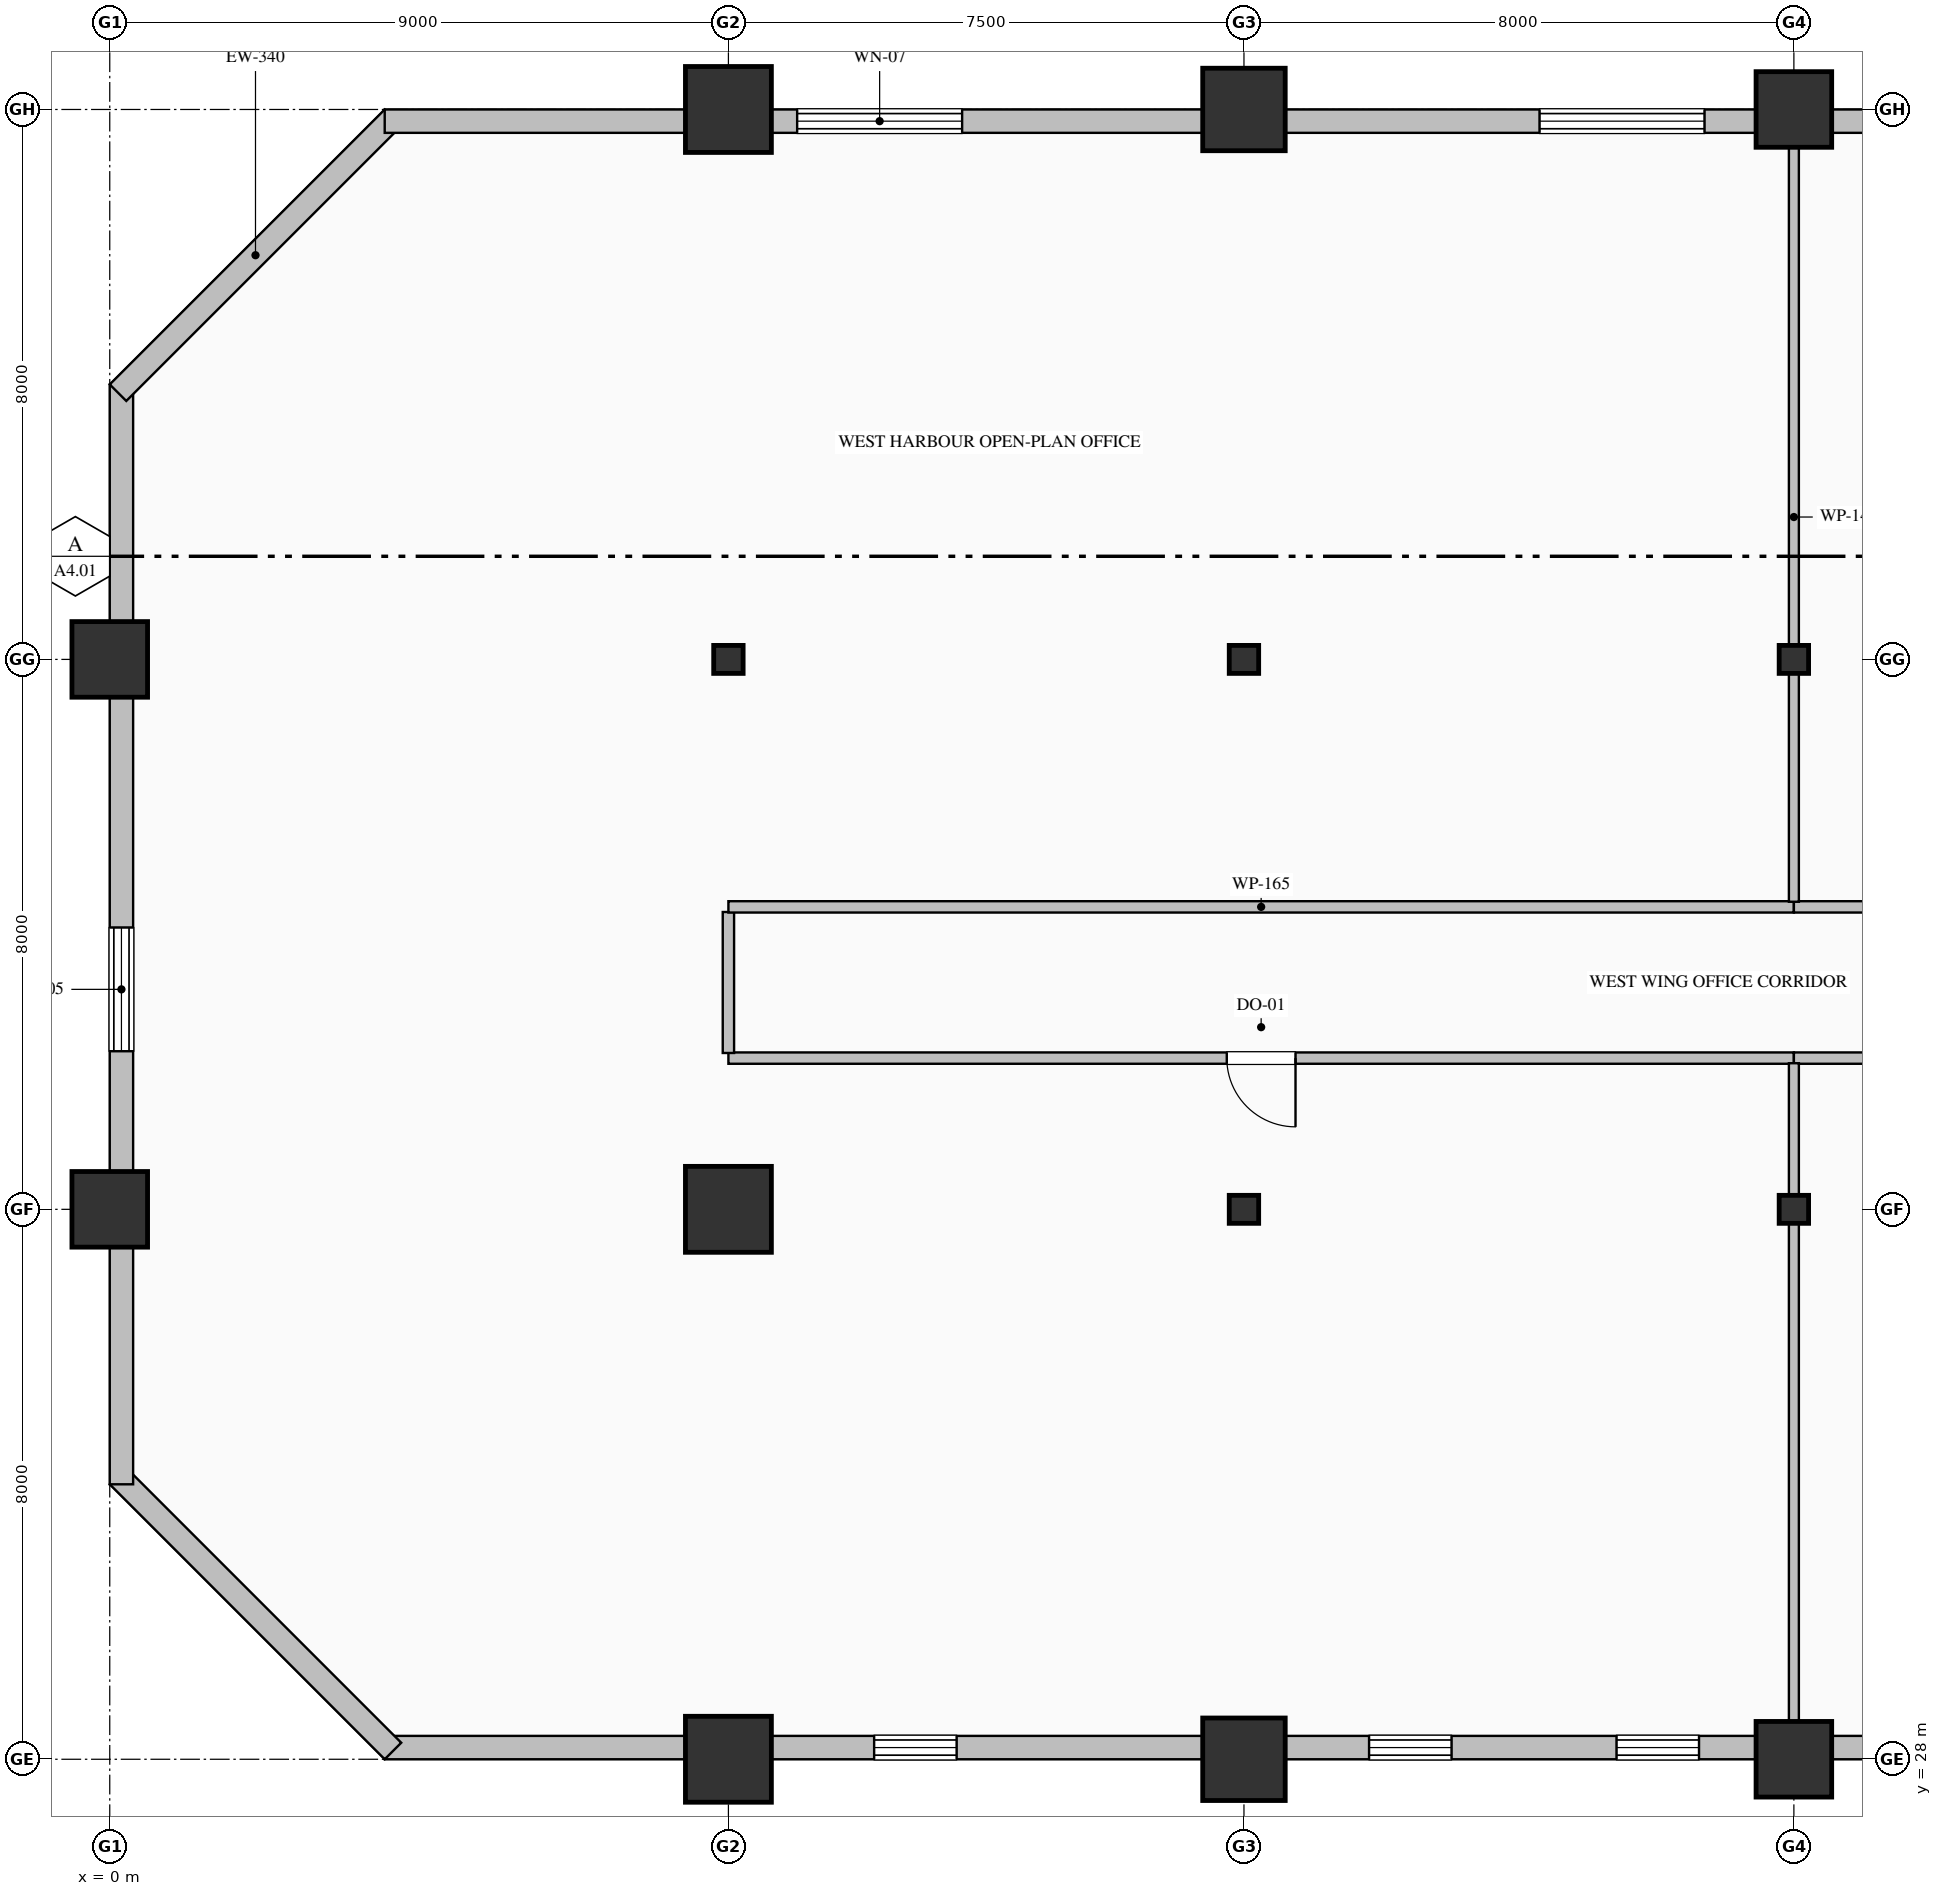
"""IFC4 building model, lengths in metres.
Left out: names, types, materials, properties, quantities, classifications, styles, units other than length and angle.
Written with IfcOpenShell. Run it as: python <this file> out.ifc"""

import sys

from ifc_helpers import new_model, si_unit, direction, frame, frame_2d, origin, origin_2d, place, context, subcontext, project, spatial, rectangle, hollow_rectangle, hollow_circle, i_section, extrude, element, fill, save


model = new_model("IFC4")
c1 = context("Model", 3, precision=1e-05, world=origin(), true_north=direction((0.0, 1.0)))
c2 = subcontext(c1, "Body", "Model", "MODEL_VIEW")
j1 = project(units=[si_unit("LENGTHUNIT", "METRE"), si_unit("PLANEANGLEUNIT", "RADIAN")], contexts=[c1])
p1 = place(None, origin())
s1 = spatial("IfcSite", under=j1, at=p1, CompositionType="ELEMENT")
p2 = place(p1, origin())
s2 = spatial("IfcBuilding", under=s1, at=p2, CompositionType="ELEMENT")
p3 = place(p2, frame((0.0, 0.0, 60.2)))
s3 = spatial("IfcBuildingStorey", under=s2, at=p3, CompositionType="ELEMENT", Elevation=60.2)
for number, where, z_axis, x_axis in (
    (1, (0.0, 36.0, 0.0), (0.0, 0.0, 1.0), (1.0, 0.0, 0.0)),
    (2, (0.0, 44.0, 0.0), (0.0, 0.0, 1.0), (1.0, 0.0, 0.0)),
):
    element("IfcColumn", number, at=place(p3, frame(where, z_axis=z_axis, x_axis=x_axis)), inside=s3, PredefinedType="COLUMN", context=c2, shape_type="SweptSolid", body=[
        extrude(hollow_rectangle(XDim=1.1, YDim=1.1, WallThickness=0.04, at=origin_2d()), origin(), (0.0, 0.0, 1.0), 4.0),
    ])
for number, where, z_axis, x_axis in (
    (3, (9.0, 28.0, 0.0), (0.0, 0.0, 1.0), (1.0, 0.0, 0.0)),
    (4, (9.0, 36.0, 0.0), (0.0, 0.0, 1.0), (1.0, 0.0, 0.0)),
):
    element("IfcColumn", number, at=place(p3, frame(where, z_axis=z_axis, x_axis=x_axis)), inside=s3, PredefinedType="COLUMN", context=c2, shape_type="SweptSolid", body=[
        extrude(hollow_rectangle(XDim=1.25, YDim=1.25, WallThickness=0.045, at=origin_2d()), origin(), (0.0, 0.0, 1.0), 4.0),
    ])
p4 = place(p3, frame((9.0, 44.0, 0.0), z_axis=(0.0, 0.0, 1.0), x_axis=(1.0, 0.0, 0.0)))
e5 = element("IfcColumn", 5, at=p4, inside=s3, PredefinedType="COLUMN", context=c2, shape_type="SweptSolid", body=[
    extrude(i_section(OverallWidth=0.407, OverallDepth=0.428, WebThickness=0.02, FlangeThickness=0.035, FilletRadius=0.022, at=origin_2d()), origin(), (0.0, 0.0, 1.0), 4.0),
])
p5 = place(p3, frame((9.0, 52.0, 0.0), z_axis=(0.0, 0.0, 1.0), x_axis=(1.0, 0.0, 0.0)))
e6 = element("IfcColumn", 6, at=p5, inside=s3, PredefinedType="COLUMN", context=c2, shape_type="SweptSolid", body=[
    extrude(hollow_rectangle(XDim=1.25, YDim=1.25, WallThickness=0.045, at=origin_2d()), origin(), (0.0, 0.0, 1.0), 4.0),
])
p6 = place(p3, frame((16.5, 28.0, 0.0), z_axis=(0.0, 0.0, 1.0), x_axis=(1.0, 0.0, 0.0)))
e7 = element("IfcColumn", 7, at=p6, inside=s3, PredefinedType="COLUMN", context=c2, shape_type="SweptSolid", body=[
    extrude(hollow_circle(Radius=0.6, WallThickness=0.04, at=origin_2d()), origin(), (0.0, 0.0, 1.0), 4.0),
])
for number, where, z_axis, x_axis in (
    (8, (16.5, 36.0, 0.0), (0.0, 0.0, 1.0), (1.0, 0.0, 0.0)),
    (9, (16.5, 44.0, 0.0), (0.0, 0.0, 1.0), (1.0, 0.0, 0.0)),
):
    element("IfcColumn", number, at=place(p3, frame(where, z_axis=z_axis, x_axis=x_axis)), inside=s3, PredefinedType="COLUMN", context=c2, shape_type="SweptSolid", body=[
        extrude(i_section(OverallWidth=0.407, OverallDepth=0.428, WebThickness=0.02, FlangeThickness=0.035, FilletRadius=0.022, at=origin_2d()), origin(), (0.0, 0.0, 1.0), 4.0),
    ])
p7 = place(p3, frame((16.5, 52.0, 0.0), z_axis=(0.0, 0.0, 1.0), x_axis=(1.0, 0.0, 0.0)))
e10 = element("IfcColumn", 10, at=p7, inside=s3, PredefinedType="COLUMN", context=c2, shape_type="SweptSolid", body=[
    extrude(hollow_circle(Radius=0.6, WallThickness=0.04, at=origin_2d()), origin(), (0.0, 0.0, 1.0), 4.0),
])
p8 = place(p3, frame((24.5, 28.0, 0.0), z_axis=(0.0, 0.0, 1.0), x_axis=(1.0, 0.0, 0.0)))
e11 = element("IfcColumn", 11, at=p8, inside=s3, PredefinedType="COLUMN", context=c2, shape_type="SweptSolid", body=[
    extrude(hollow_rectangle(XDim=1.1, YDim=1.1, WallThickness=0.04, at=origin_2d()), origin(), (0.0, 0.0, 1.0), 4.0),
])
for number, where, z_axis, x_axis in (
    (12, (24.5, 36.0, 0.0), (0.0, 0.0, 1.0), (1.0, 0.0, 0.0)),
    (13, (24.5, 44.0, 0.0), (0.0, 0.0, 1.0), (1.0, 0.0, 0.0)),
):
    element("IfcColumn", number, at=place(p3, frame(where, z_axis=z_axis, x_axis=x_axis)), inside=s3, PredefinedType="COLUMN", context=c2, shape_type="SweptSolid", body=[
        extrude(i_section(OverallWidth=0.407, OverallDepth=0.428, WebThickness=0.02, FlangeThickness=0.035, FilletRadius=0.022, at=origin_2d()), origin(), (0.0, 0.0, 1.0), 4.0),
    ])
p9 = place(p3, frame((24.5, 52.0, 0.0), z_axis=(0.0, 0.0, 1.0), x_axis=(1.0, 0.0, 0.0)))
e14 = element("IfcColumn", 14, at=p9, inside=s3, PredefinedType="COLUMN", context=c2, shape_type="SweptSolid", body=[
    extrude(hollow_rectangle(XDim=1.1, YDim=1.1, WallThickness=0.04, at=origin_2d()), origin(), (0.0, 0.0, 1.0), 4.0),
])
p10 = place(p3, frame((40.52, 28.17, 0.0), z_axis=(0.0, 0.0, 1.0), x_axis=(-1.0, 0.0, 0.0)))
e15 = element("IfcWall", 15, at=p10, inside=s3, PredefinedType="SOLIDWALL", context=c2, shape_type="SweptSolid", body=[
    extrude(rectangle(XDim=36.52, YDim=0.34, at=frame_2d((18.26, 0.0))), origin(), (0.0, 0.0, 1.0), 3.05),
])
p11 = place(p10, frame((10.2, 0.0, 0.7)))
e16 = element("IfcOpeningElement", 16, at=p11, cuts=e15, PredefinedType="OPENING", context=c2, shape_type="SweptSolid", body=[
    extrude(rectangle(XDim=1.2, YDim=1.85, at=frame_2d((0.6, 0.925))), frame((0.0, 0.18, 0.0), z_axis=(0.0, -1.0, 0.0), x_axis=(1.0, 0.0, 0.0)), (0.0, 0.0, 1.0), 0.36),
])
p12 = place(p10, frame((13.8, 0.0, 0.7)))
e17 = element("IfcOpeningElement", 17, at=p12, cuts=e15, PredefinedType="OPENING", context=c2, shape_type="SweptSolid", body=[
    extrude(rectangle(XDim=1.2, YDim=1.85, at=frame_2d((0.6, 0.925))), frame((0.0, 0.18, 0.0), z_axis=(0.0, -1.0, 0.0), x_axis=(1.0, 0.0, 0.0)), (0.0, 0.0, 1.0), 0.36),
])
p13 = place(p10, frame((17.4, 0.0, 0.7)))
e18 = element("IfcOpeningElement", 18, at=p13, cuts=e15, PredefinedType="OPENING", context=c2, shape_type="SweptSolid", body=[
    extrude(rectangle(XDim=1.2, YDim=1.85, at=frame_2d((0.6, 0.925))), frame((0.0, 0.18, 0.0), z_axis=(0.0, -1.0, 0.0), x_axis=(1.0, 0.0, 0.0)), (0.0, 0.0, 1.0), 0.36),
])
p14 = place(p10, frame((21.0, 0.0, 0.7)))
e19 = element("IfcOpeningElement", 19, at=p14, cuts=e15, PredefinedType="OPENING", context=c2, shape_type="SweptSolid", body=[
    extrude(rectangle(XDim=1.2, YDim=1.85, at=frame_2d((0.6, 0.925))), frame((0.0, 0.18, 0.0), z_axis=(0.0, -1.0, 0.0), x_axis=(1.0, 0.0, 0.0)), (0.0, 0.0, 1.0), 0.36),
])
p15 = place(p10, frame((28.2, 0.0, 0.7)))
e20 = element("IfcOpeningElement", 20, at=p15, cuts=e15, PredefinedType="OPENING", context=c2, shape_type="SweptSolid", body=[
    extrude(rectangle(XDim=1.2, YDim=1.85, at=frame_2d((0.6, 0.925))), frame((0.0, 0.18, 0.0), z_axis=(0.0, -1.0, 0.0), x_axis=(1.0, 0.0, 0.0)), (0.0, 0.0, 1.0), 0.36),
])
p16 = place(p3, frame((4.12, 28.12, 0.0), z_axis=(0.0, 0.0, 1.0), x_axis=(-0.707106781187, 0.707106781187, 0.0)))
e21 = element("IfcWall", 21, at=p16, inside=s3, PredefinedType="SOLIDWALL", context=c2, shape_type="SweptSolid", body=[
    extrude(rectangle(XDim=5.657, YDim=0.34, at=frame_2d((2.828, 0.0))), origin(), (0.0, 0.0, 1.0), 3.75),
])
p17 = place(p3, frame((0.17, 32.0, 0.0), z_axis=(0.0, 0.0, 1.0), x_axis=(0.0, 1.0, 0.0)))
e22 = element("IfcWall", 22, at=p17, inside=s3, PredefinedType="SOLIDWALL", context=c2, shape_type="SweptSolid", body=[
    extrude(rectangle(XDim=16.0, YDim=0.34, at=frame_2d((8.0, 0.0))), origin(), (0.0, 0.0, 1.0), 3.25),
])
p18 = place(p17, frame((6.3, 0.0, 0.85)))
e23 = element("IfcOpeningElement", 23, at=p18, cuts=e22, PredefinedType="OPENING", context=c2, shape_type="SweptSolid", body=[
    extrude(rectangle(XDim=1.8, YDim=2.05, at=frame_2d((0.9, 1.025))), frame((0.0, 0.18, 0.0), z_axis=(0.0, -1.0, 0.0), x_axis=(1.0, 0.0, 0.0)), (0.0, 0.0, 1.0), 0.36),
])
p19 = place(p3, frame((0.12, 47.88, 0.0), z_axis=(0.0, 0.0, 1.0), x_axis=(0.707106781187, 0.707106781187, 0.0)))
e24 = element("IfcWall", 24, at=p19, inside=s3, PredefinedType="SOLIDWALL", context=c2, shape_type="SweptSolid", body=[
    extrude(rectangle(XDim=5.657, YDim=0.34, at=frame_2d((2.828, 0.0))), origin(), (0.0, 0.0, 1.0), 3.75),
])
p20 = place(p3, frame((4.0, 51.83, 0.0), z_axis=(0.0, 0.0, 1.0), x_axis=(1.0, 0.0, 0.0)))
e25 = element("IfcWall", 25, at=p20, inside=s3, PredefinedType="SOLIDWALL", context=c2, shape_type="SweptSolid", body=[
    extrude(rectangle(XDim=36.52, YDim=0.34, at=frame_2d((18.26, 0.0))), origin(), (0.0, 0.0, 1.0), 3.25),
])
p21 = place(p20, frame((6.0, 0.0, 0.8)))
e26 = element("IfcOpeningElement", 26, at=p21, cuts=e25, PredefinedType="OPENING", context=c2, shape_type="SweptSolid", body=[
    extrude(rectangle(XDim=2.4, YDim=2.15, at=frame_2d((1.2, 1.075))), frame((0.0, 0.18, 0.0), z_axis=(0.0, -1.0, 0.0), x_axis=(1.0, 0.0, 0.0)), (0.0, 0.0, 1.0), 0.36),
])
p22 = place(p20, frame((16.8, 0.0, 0.8)))
e27 = element("IfcOpeningElement", 27, at=p22, cuts=e25, PredefinedType="OPENING", context=c2, shape_type="SweptSolid", body=[
    extrude(rectangle(XDim=2.4, YDim=2.15, at=frame_2d((1.2, 1.075))), frame((0.0, 0.18, 0.0), z_axis=(0.0, -1.0, 0.0), x_axis=(1.0, 0.0, 0.0)), (0.0, 0.0, 1.0), 0.36),
])
p23 = place(p20, frame((24.15, 0.0, 0.85)))
e28 = element("IfcOpeningElement", 28, at=p23, cuts=e25, PredefinedType="OPENING", context=c2, shape_type="SweptSolid", body=[
    extrude(rectangle(XDim=2.1, YDim=2.05, at=frame_2d((1.05, 1.025))), frame((0.0, 0.18, 0.0), z_axis=(0.0, -1.0, 0.0), x_axis=(1.0, 0.0, 0.0)), (0.0, 0.0, 1.0), 0.36),
])
p24 = place(p3, frame((24.5, 38.2, 0.0), z_axis=(0.0, 0.0, 1.0), x_axis=(-1.0, 0.0, 0.0)))
e29 = element("IfcWall", 29, at=p24, inside=s3, PredefinedType="PARTITIONING", context=c2, shape_type="SweptSolid", body=[
    extrude(rectangle(XDim=15.5, YDim=0.165, at=frame_2d((7.75, 0.0))), origin(), (0.0, 0.0, 1.0), 3.75),
])
p25 = place(p24, frame((7.25, 0.0, 0.0)))
e30 = element("IfcOpeningElement", 30, at=p25, cuts=e29, PredefinedType="OPENING", context=c2, shape_type="SweptSolid", body=[
    extrude(rectangle(XDim=1.0, YDim=2.15, at=frame_2d((0.5, 1.075))), frame((0.0, 0.093, 0.0), z_axis=(0.0, -1.0, 0.0), x_axis=(1.0, 0.0, 0.0)), (0.0, 0.0, 1.0), 0.185),
])
p26 = place(p3, frame((9.0, 38.274, 0.0), z_axis=(0.0, 0.0, 1.0), x_axis=(0.0, 1.0, 0.0)))
e31 = element("IfcWall", 31, at=p26, inside=s3, PredefinedType="PARTITIONING", context=c2, shape_type="SweptSolid", body=[
    extrude(rectangle(XDim=2.051, YDim=0.165, at=frame_2d((1.025, 0.0))), origin(), (0.0, 0.0, 1.0), 3.042),
])
p27 = place(p3, frame((9.0, 40.4, 0.0), z_axis=(0.0, 0.0, 1.0), x_axis=(1.0, 0.0, 0.0)))
e32 = element("IfcWall", 32, at=p27, inside=s3, PredefinedType="PARTITIONING", context=c2, shape_type="SweptSolid", body=[
    extrude(rectangle(XDim=15.5, YDim=0.165, at=frame_2d((7.75, 0.0))), origin(), (0.0, 0.0, 1.0), 3.75),
])
p28 = place(p3, frame((24.5, 40.4, 0.0), z_axis=(0.0, 0.0, 1.0), x_axis=(1.0, 0.0, 0.0)))
e33 = element("IfcWall", 33, at=p28, inside=s3, PredefinedType="PARTITIONING", context=c2, shape_type="SweptSolid", body=[
    extrude(rectangle(XDim=13.3, YDim=0.165, at=frame_2d((6.65, 0.0))), origin(), (0.0, 0.0, 1.0), 3.75),
])
p29 = place(p28, frame((6.2, 0.0, 0.0)))
e34 = element("IfcOpeningElement", 34, at=p29, cuts=e33, PredefinedType="OPENING", context=c2, shape_type="SweptSolid", body=[
    extrude(rectangle(XDim=0.9, YDim=2.15, at=frame_2d((0.45, 1.075))), frame((0.0, 0.093, 0.0), z_axis=(0.0, -1.0, 0.0), x_axis=(1.0, 0.0, 0.0)), (0.0, 0.0, 1.0), 0.185),
])
p30 = place(p3, frame((31.0, 38.2, 0.0), z_axis=(0.0, 0.0, 1.0), x_axis=(-1.0, 0.0, 0.0)))
e35 = element("IfcWall", 35, at=p30, inside=s3, PredefinedType="PARTITIONING", context=c2, shape_type="SweptSolid", body=[
    extrude(rectangle(XDim=6.5, YDim=0.165, at=frame_2d((3.25, 0.0))), origin(), (0.0, 0.0, 1.0), 3.75),
])
p31 = place(p30, frame((2.75, 0.0, 0.0)))
e36 = element("IfcOpeningElement", 36, at=p31, cuts=e35, PredefinedType="OPENING", context=c2, shape_type="SweptSolid", body=[
    extrude(rectangle(XDim=1.0, YDim=2.15, at=frame_2d((0.5, 1.075))), frame((0.0, 0.093, 0.0), z_axis=(0.0, -1.0, 0.0), x_axis=(1.0, 0.0, 0.0)), (0.0, 0.0, 1.0), 0.185),
])
p32 = place(p3, frame((24.5, 51.668, 0.0), z_axis=(0.0, 0.0, 1.0), x_axis=(0.0, -1.0, 0.0)))
e37 = element("IfcWall", 37, at=p32, inside=s3, PredefinedType="PARTITIONING", context=c2, shape_type="SweptSolid", body=[
    extrude(rectangle(XDim=11.193, YDim=0.145, at=frame_2d((5.597, 0.0))), origin(), (0.0, 0.0, 1.0), 3.042),
])
p33 = place(p3, frame((24.5, 38.125, 0.0), z_axis=(0.0, 0.0, 1.0), x_axis=(0.0, -1.0, 0.0)))
e38 = element("IfcWall", 38, at=p33, inside=s3, PredefinedType="PARTITIONING", context=c2, shape_type="SweptSolid", body=[
    extrude(rectangle(XDim=9.793, YDim=0.145, at=frame_2d((4.897, 0.0))), origin(), (0.0, 0.0, 1.0), 3.042),
])
p34 = place(p13, origin())
e39 = element("IfcWindow", 39, at=p34, inside=s3, PartitioningType="DOUBLE_PANEL_VERTICAL", PredefinedType="WINDOW", context=c2, shape_type="SweptSolid", body=[
    extrude(rectangle(XDim=1.2, YDim=1.85, at=frame_2d((0.6, 0.925))), frame((0.0, 0.15, 0.0), z_axis=(0.0, -1.0, 0.0), x_axis=(1.0, 0.0, 0.0)), (0.0, 0.0, 1.0), 0.06),
])
fill(e18, e39)
p35 = place(p14, origin())
e40 = element("IfcWindow", 40, at=p35, inside=s3, PartitioningType="DOUBLE_PANEL_VERTICAL", PredefinedType="WINDOW", context=c2, shape_type="SweptSolid", body=[
    extrude(rectangle(XDim=1.2, YDim=1.85, at=frame_2d((0.6, 0.925))), frame((0.0, 0.15, 0.0), z_axis=(0.0, -1.0, 0.0), x_axis=(1.0, 0.0, 0.0)), (0.0, 0.0, 1.0), 0.06),
])
fill(e19, e40)
p36 = place(p15, origin())
e41 = element("IfcWindow", 41, at=p36, inside=s3, PartitioningType="DOUBLE_PANEL_VERTICAL", PredefinedType="WINDOW", context=c2, shape_type="SweptSolid", body=[
    extrude(rectangle(XDim=1.2, YDim=1.85, at=frame_2d((0.6, 0.925))), frame((0.0, 0.15, 0.0), z_axis=(0.0, -1.0, 0.0), x_axis=(1.0, 0.0, 0.0)), (0.0, 0.0, 1.0), 0.06),
])
fill(e20, e41)
p37 = place(p18, origin())
e42 = element("IfcWindow", 42, at=p37, inside=s3, PartitioningType="TRIPLE_PANEL_VERTICAL", PredefinedType="WINDOW", context=c2, shape_type="SweptSolid", body=[
    extrude(rectangle(XDim=1.8, YDim=2.05, at=frame_2d((0.9, 1.025))), frame((0.0, 0.15, 0.0), z_axis=(0.0, -1.0, 0.0), x_axis=(1.0, 0.0, 0.0)), (0.0, 0.0, 1.0), 0.06),
])
fill(e23, e42)
p38 = place(p21, origin())
e43 = element("IfcWindow", 43, at=p38, inside=s3, PartitioningType="TRIPLE_PANEL_VERTICAL", PredefinedType="WINDOW", context=c2, shape_type="SweptSolid", body=[
    extrude(rectangle(XDim=2.4, YDim=2.15, at=frame_2d((1.2, 1.075))), frame((0.0, 0.15, 0.0), z_axis=(0.0, -1.0, 0.0), x_axis=(1.0, 0.0, 0.0)), (0.0, 0.0, 1.0), 0.06),
])
fill(e26, e43)
p39 = place(p22, origin())
e44 = element("IfcWindow", 44, at=p39, inside=s3, PartitioningType="TRIPLE_PANEL_VERTICAL", PredefinedType="WINDOW", context=c2, shape_type="SweptSolid", body=[
    extrude(rectangle(XDim=2.4, YDim=2.15, at=frame_2d((1.2, 1.075))), frame((0.0, 0.15, 0.0), z_axis=(0.0, -1.0, 0.0), x_axis=(1.0, 0.0, 0.0)), (0.0, 0.0, 1.0), 0.06),
])
fill(e27, e44)
p40 = place(p25, origin())
e45 = element("IfcDoor", 45, at=p40, inside=s3, OperationType="SINGLE_SWING_LEFT", PredefinedType="DOOR", context=c2, shape_type="SweptSolid", body=[
    extrude(rectangle(XDim=1.0, YDim=2.15, at=frame_2d((0.5, 1.075))), frame((0.0, 0.025, 0.0), z_axis=(0.0, -1.0, 0.0), x_axis=(1.0, 0.0, 0.0)), (0.0, 0.0, 1.0), 0.05),
])
fill(e30, e45)
save(model, sys.argv[1])
